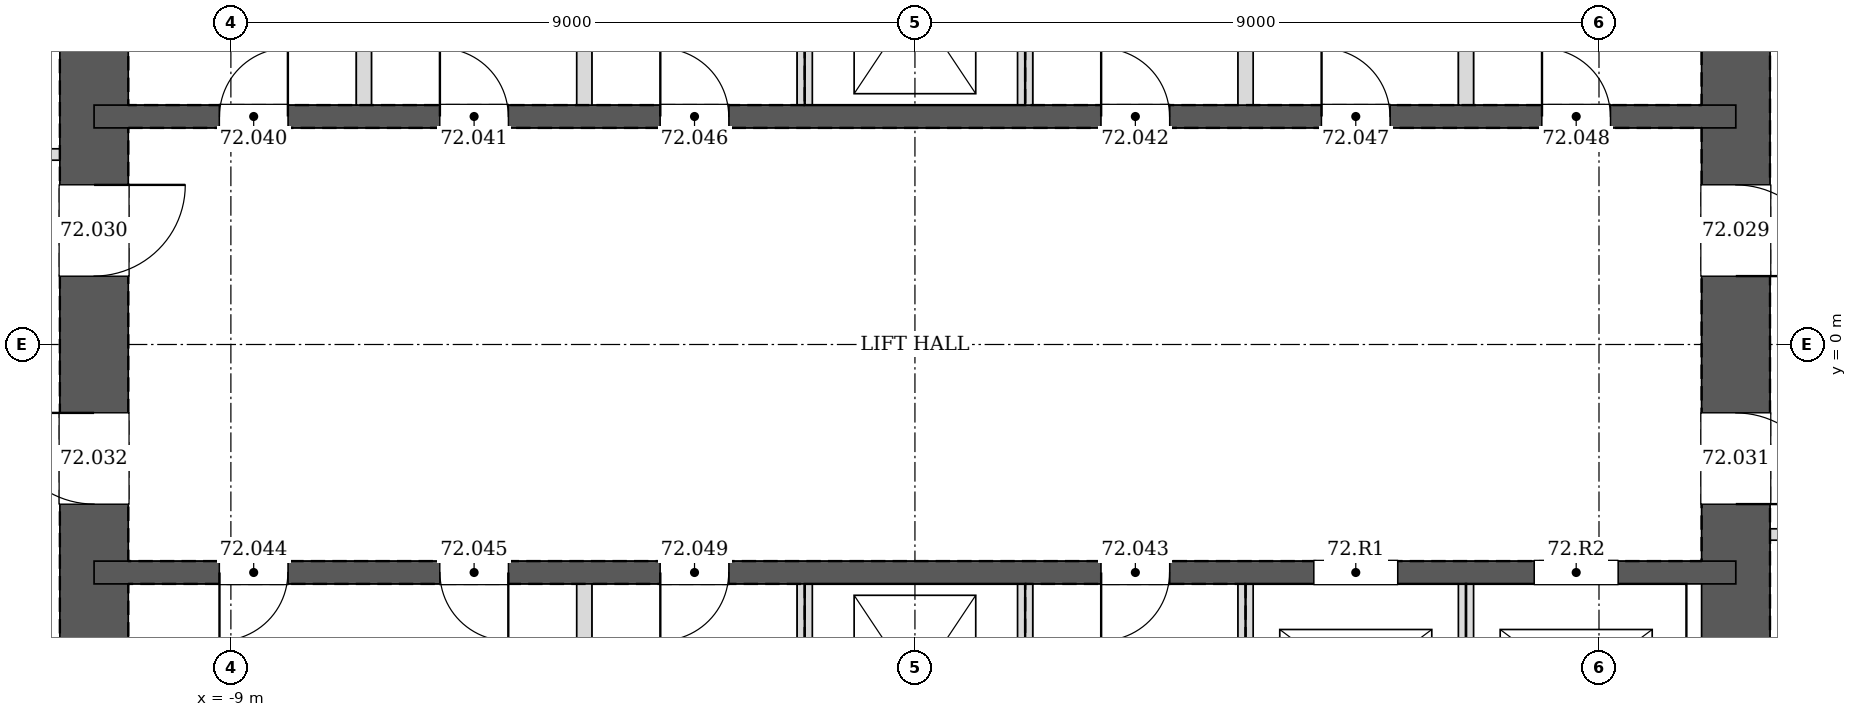
"""IFC4 building model, lengths in metres.
Left out: names, types, materials, properties, quantities, classifications, styles, units other than length and angle.
Written with IfcOpenShell. Run it as: python <this file> out.ifc"""

import sys

from ifc_helpers import new_model, si_unit, direction, frame, frame_2d, origin, place, context, subcontext, project, spatial, rectangle, extrude, element, fill, save


model = new_model("IFC4")
c1 = context("Model", 3, precision=1e-05, world=origin(), true_north=direction((0.0, 1.0)))
c2 = subcontext(c1, "Body", "Model", "MODEL_VIEW")
j1 = project(units=[si_unit("LENGTHUNIT", "METRE"), si_unit("PLANEANGLEUNIT", "RADIAN")], contexts=[c1])
p1 = place(None, origin())
s1 = spatial("IfcSite", under=j1, at=p1, CompositionType="ELEMENT")
p2 = place(p1, origin())
s2 = spatial("IfcBuilding", under=s1, at=p2, CompositionType="ELEMENT")
p3 = place(p2, frame((0.0, 0.0, 294.6)))
s3 = spatial("IfcBuildingStorey", under=s2, at=p3, CompositionType="ELEMENT", Elevation=294.6)
p4 = place(p3, frame((10.8, -10.8, 0.0), z_axis=(0.0, 0.0, 1.0), x_axis=(0.0, 1.0, 0.0)))
e1 = element("IfcWall", 1, at=p4, inside=s3, PredefinedType="SOLIDWALL", context=c2, shape_type="SweptSolid", body=[
    extrude(rectangle(XDim=21.6, YDim=0.9, at=frame_2d((10.8, 0.0))), origin(), (0.0, 0.0, 1.0), 3.4),
])
p5 = place(p4, frame((11.7, 0.0, 0.0)))
e2 = element("IfcOpeningElement", 2, at=p5, cuts=e1, PredefinedType="OPENING", context=c2, shape_type="SweptSolid", body=[
    extrude(rectangle(XDim=1.2, YDim=2.1, at=frame_2d((0.6, 1.05))), frame((0.0, 0.46, 0.0), z_axis=(0.0, -1.0, 0.0), x_axis=(1.0, 0.0, 0.0)), (0.0, 0.0, 1.0), 0.92),
])
p6 = place(p4, frame((8.7, 0.0, 0.0)))
e3 = element("IfcOpeningElement", 3, at=p6, cuts=e1, PredefinedType="OPENING", context=c2, shape_type="SweptSolid", body=[
    extrude(rectangle(XDim=1.2, YDim=2.1, at=frame_2d((0.6, 1.05))), frame((0.0, 0.46, 0.0), z_axis=(0.0, -1.0, 0.0), x_axis=(1.0, 0.0, 0.0)), (0.0, 0.0, 1.0), 0.92),
])
p7 = place(p3, frame((-10.8, 10.8, 0.0), z_axis=(0.0, 0.0, 1.0), x_axis=(0.0, -1.0, 0.0)))
e4 = element("IfcWall", 4, at=p7, inside=s3, PredefinedType="SOLIDWALL", context=c2, shape_type="SweptSolid", body=[
    extrude(rectangle(XDim=21.6, YDim=0.9, at=frame_2d((10.8, 0.0))), origin(), (0.0, 0.0, 1.0), 3.4),
])
p8 = place(p7, frame((8.7, 0.0, 0.0)))
e5 = element("IfcOpeningElement", 5, at=p8, cuts=e4, PredefinedType="OPENING", context=c2, shape_type="SweptSolid", body=[
    extrude(rectangle(XDim=1.2, YDim=2.1, at=frame_2d((0.6, 1.05))), frame((0.0, 0.46, 0.0), z_axis=(0.0, -1.0, 0.0), x_axis=(1.0, 0.0, 0.0)), (0.0, 0.0, 1.0), 0.92),
])
p9 = place(p7, frame((11.7, 0.0, 0.0)))
e6 = element("IfcOpeningElement", 6, at=p9, cuts=e4, PredefinedType="OPENING", context=c2, shape_type="SweptSolid", body=[
    extrude(rectangle(XDim=1.2, YDim=2.1, at=frame_2d((0.6, 1.05))), frame((0.0, 0.46, 0.0), z_axis=(0.0, -1.0, 0.0), x_axis=(1.0, 0.0, 0.0)), (0.0, 0.0, 1.0), 0.92),
])
p10 = place(p3, frame((-10.8, 3.0, 0.0), z_axis=(0.0, 0.0, 1.0), x_axis=(1.0, 0.0, 0.0)))
e7 = element("IfcWall", 7, at=p10, inside=s3, PredefinedType="SOLIDWALL", context=c2, shape_type="SweptSolid", body=[
    extrude(rectangle(XDim=21.6, YDim=0.3, at=frame_2d((10.8, 0.0))), origin(), (0.0, 0.0, 1.0), 3.4),
])
p11 = place(p10, frame((1.65, 0.0, 0.0)))
e8 = element("IfcOpeningElement", 8, at=p11, cuts=e7, PredefinedType="OPENING", context=c2, shape_type="SweptSolid", body=[
    extrude(rectangle(XDim=0.9, YDim=2.1, at=frame_2d((0.45, 1.05))), frame((0.0, 0.16, 0.0), z_axis=(0.0, -1.0, 0.0), x_axis=(1.0, 0.0, 0.0)), (0.0, 0.0, 1.0), 0.32),
])
p12 = place(p10, frame((4.55, 0.0, 0.0)))
e9 = element("IfcOpeningElement", 9, at=p12, cuts=e7, PredefinedType="OPENING", context=c2, shape_type="SweptSolid", body=[
    extrude(rectangle(XDim=0.9, YDim=2.1, at=frame_2d((0.45, 1.05))), frame((0.0, 0.16, 0.0), z_axis=(0.0, -1.0, 0.0), x_axis=(1.0, 0.0, 0.0)), (0.0, 0.0, 1.0), 0.32),
])
p13 = place(p10, frame((13.25, 0.0, 0.0)))
e10 = element("IfcOpeningElement", 10, at=p13, cuts=e7, PredefinedType="OPENING", context=c2, shape_type="SweptSolid", body=[
    extrude(rectangle(XDim=0.9, YDim=2.1, at=frame_2d((0.45, 1.05))), frame((0.0, 0.16, 0.0), z_axis=(0.0, -1.0, 0.0), x_axis=(1.0, 0.0, 0.0)), (0.0, 0.0, 1.0), 0.32),
])
p14 = place(p10, frame((7.45, 0.0, 0.0)))
e11 = element("IfcOpeningElement", 11, at=p14, cuts=e7, PredefinedType="OPENING", context=c2, shape_type="SweptSolid", body=[
    extrude(rectangle(XDim=0.9, YDim=2.1, at=frame_2d((0.45, 1.05))), frame((0.0, 0.16, 0.0), z_axis=(0.0, -1.0, 0.0), x_axis=(1.0, 0.0, 0.0)), (0.0, 0.0, 1.0), 0.32),
])
p15 = place(p10, frame((16.15, 0.0, 0.0)))
e12 = element("IfcOpeningElement", 12, at=p15, cuts=e7, PredefinedType="OPENING", context=c2, shape_type="SweptSolid", body=[
    extrude(rectangle(XDim=0.9, YDim=2.1, at=frame_2d((0.45, 1.05))), frame((0.0, 0.16, 0.0), z_axis=(0.0, -1.0, 0.0), x_axis=(1.0, 0.0, 0.0)), (0.0, 0.0, 1.0), 0.32),
])
p16 = place(p10, frame((19.05, 0.0, 0.0)))
e13 = element("IfcOpeningElement", 13, at=p16, cuts=e7, PredefinedType="OPENING", context=c2, shape_type="SweptSolid", body=[
    extrude(rectangle(XDim=0.9, YDim=2.1, at=frame_2d((0.45, 1.05))), frame((0.0, 0.16, 0.0), z_axis=(0.0, -1.0, 0.0), x_axis=(1.0, 0.0, 0.0)), (0.0, 0.0, 1.0), 0.32),
])
p17 = place(p3, frame((-10.8, -3.0, 0.0), z_axis=(0.0, 0.0, 1.0), x_axis=(1.0, 0.0, 0.0)))
e14 = element("IfcWall", 14, at=p17, inside=s3, PredefinedType="SOLIDWALL", context=c2, shape_type="SweptSolid", body=[
    extrude(rectangle(XDim=21.6, YDim=0.3, at=frame_2d((10.8, 0.0))), origin(), (0.0, 0.0, 1.0), 3.4),
])
p18 = place(p17, frame((13.25, 0.0, 0.0)))
e15 = element("IfcOpeningElement", 15, at=p18, cuts=e14, PredefinedType="OPENING", context=c2, shape_type="SweptSolid", body=[
    extrude(rectangle(XDim=0.9, YDim=2.1, at=frame_2d((0.45, 1.05))), frame((0.0, 0.16, 0.0), z_axis=(0.0, -1.0, 0.0), x_axis=(1.0, 0.0, 0.0)), (0.0, 0.0, 1.0), 0.32),
])
p19 = place(p17, frame((1.65, 0.0, 0.0)))
e16 = element("IfcOpeningElement", 16, at=p19, cuts=e14, PredefinedType="OPENING", context=c2, shape_type="SweptSolid", body=[
    extrude(rectangle(XDim=0.9, YDim=2.1, at=frame_2d((0.45, 1.05))), frame((0.0, 0.16, 0.0), z_axis=(0.0, -1.0, 0.0), x_axis=(1.0, 0.0, 0.0)), (0.0, 0.0, 1.0), 0.32),
])
p20 = place(p17, frame((4.55, 0.0, 0.0)))
e17 = element("IfcOpeningElement", 17, at=p20, cuts=e14, PredefinedType="OPENING", context=c2, shape_type="SweptSolid", body=[
    extrude(rectangle(XDim=0.9, YDim=2.1, at=frame_2d((0.45, 1.05))), frame((0.0, 0.16, 0.0), z_axis=(0.0, -1.0, 0.0), x_axis=(1.0, 0.0, 0.0)), (0.0, 0.0, 1.0), 0.32),
])
p21 = place(p17, frame((7.45, 0.0, 0.0)))
e18 = element("IfcOpeningElement", 18, at=p21, cuts=e14, PredefinedType="OPENING", context=c2, shape_type="SweptSolid", body=[
    extrude(rectangle(XDim=0.9, YDim=2.1, at=frame_2d((0.45, 1.05))), frame((0.0, 0.16, 0.0), z_axis=(0.0, -1.0, 0.0), x_axis=(1.0, 0.0, 0.0)), (0.0, 0.0, 1.0), 0.32),
])
p22 = place(p17, frame((16.05, 0.0, 0.0)))
e19 = element("IfcOpeningElement", 19, at=p22, cuts=e14, PredefinedType="OPENING", context=c2, shape_type="SweptSolid", body=[
    extrude(rectangle(XDim=1.1, YDim=2.1, at=frame_2d((0.55, 1.05))), frame((0.0, 0.16, 0.0), z_axis=(0.0, -1.0, 0.0), x_axis=(1.0, 0.0, 0.0)), (0.0, 0.0, 1.0), 0.32),
])
p23 = place(p17, frame((18.95, 0.0, 0.0)))
e20 = element("IfcOpeningElement", 20, at=p23, cuts=e14, PredefinedType="OPENING", context=c2, shape_type="SweptSolid", body=[
    extrude(rectangle(XDim=1.1, YDim=2.1, at=frame_2d((0.55, 1.05))), frame((0.0, 0.16, 0.0), z_axis=(0.0, -1.0, 0.0), x_axis=(1.0, 0.0, 0.0)), (0.0, 0.0, 1.0), 0.32),
])
p24 = place(p3, frame((11.25, -2.5, 0.0), z_axis=(0.0, 0.0, 1.0), x_axis=(1.0, 0.0, 0.0)))
e21 = element("IfcWall", 21, at=p24, inside=s3, PredefinedType="PARTITIONING", context=c2, shape_type="SweptSolid", body=[
    extrude(rectangle(XDim=1.65, YDim=0.15, at=frame_2d((0.825, 0.0))), origin(), (0.0, 0.0, 1.0), 3.2),
])
p25 = place(p3, frame((-11.25, 2.5, 0.0), z_axis=(0.0, 0.0, 1.0), x_axis=(-1.0, 0.0, 0.0)))
e22 = element("IfcWall", 22, at=p25, inside=s3, PredefinedType="PARTITIONING", context=c2, shape_type="SweptSolid", body=[
    extrude(rectangle(XDim=1.65, YDim=0.15, at=frame_2d((0.825, 0.0))), origin(), (0.0, 0.0, 1.0), 3.2),
])
p26 = place(p25, frame((0.35, 0.0, 0.0)))
e23 = element("IfcOpeningElement", 23, at=p26, cuts=e22, PredefinedType="OPENING", context=c2, shape_type="SweptSolid", body=[
    extrude(rectangle(XDim=0.95, YDim=2.1, at=frame_2d((0.475, 1.05))), frame((0.0, 0.085, 0.0), z_axis=(0.0, -1.0, 0.0), x_axis=(1.0, 0.0, 0.0)), (0.0, 0.0, 1.0), 0.17),
])
for number, where, z_axis, x_axis in (
    (24, (-7.25, 3.15, 0.0), (0.0, 0.0, 1.0), (0.0, 1.0, 0.0)),
    (25, (-4.35, 3.15, 0.0), (0.0, 0.0, 1.0), (0.0, 1.0, 0.0)),
    (26, (-1.45, 3.15, 0.0), (0.0, 0.0, 1.0), (0.0, 1.0, 0.0)),
    (27, (1.45, 3.15, 0.0), (0.0, 0.0, 1.0), (0.0, 1.0, 0.0)),
    (28, (4.35, 3.15, 0.0), (0.0, 0.0, 1.0), (0.0, 1.0, 0.0)),
    (29, (7.25, 3.15, 0.0), (0.0, 0.0, 1.0), (0.0, 1.0, 0.0)),
    (30, (-4.35, -5.85, 0.0), (0.0, 0.0, 1.0), (0.0, 1.0, 0.0)),
    (31, (-1.45, -5.85, 0.0), (0.0, 0.0, 1.0), (0.0, 1.0, 0.0)),
    (32, (1.45, -5.85, 0.0), (0.0, 0.0, 1.0), (0.0, 1.0, 0.0)),
    (33, (4.35, -5.85, 0.0), (0.0, 0.0, 1.0), (0.0, 1.0, 0.0)),
):
    element("IfcWall", number, at=place(p3, frame(where, z_axis=z_axis, x_axis=x_axis)), inside=s3, PredefinedType="PARTITIONING", context=c2, shape_type="SweptSolid", body=[
        extrude(rectangle(XDim=2.7, YDim=0.2, at=frame_2d((1.35, 0.0))), origin(), (0.0, 0.0, 1.0), 3.2),
    ])
p27 = place(p3, frame((7.25, -5.85, 0.0), z_axis=(0.0, 0.0, 1.0), x_axis=(0.0, 1.0, 0.0)))
e34 = element("IfcWall", 34, at=p27, inside=s3, PredefinedType="PARTITIONING", context=c2, shape_type="SweptSolid", body=[
    extrude(rectangle(XDim=2.7, YDim=0.2, at=frame_2d((1.35, 0.0))), origin(), (0.0, 0.0, 1.0), 3.4),
])
p28 = place(p5, frame((1.2, 0.0, 0.0), z_axis=(0.0, 0.0, 1.0), x_axis=(-1.0, 0.0, 0.0)))
e35 = element("IfcDoor", 35, at=p28, inside=s3, OperationType="SINGLE_SWING_RIGHT", PredefinedType="DOOR", context=c2, shape_type="SweptSolid", body=[
    extrude(rectangle(XDim=1.2, YDim=2.1, at=frame_2d((0.6, 1.05))), frame((0.0, 0.025, 0.0), z_axis=(0.0, -1.0, 0.0), x_axis=(1.0, 0.0, 0.0)), (0.0, 0.0, 1.0), 0.05),
])
fill(e2, e35)
p29 = place(p8, origin())
e36 = element("IfcDoor", 36, at=p29, inside=s3, OperationType="SINGLE_SWING_LEFT", PredefinedType="DOOR", context=c2, shape_type="SweptSolid", body=[
    extrude(rectangle(XDim=1.2, YDim=2.1, at=frame_2d((0.6, 1.05))), frame((0.0, 0.025, 0.0), z_axis=(0.0, -1.0, 0.0), x_axis=(1.0, 0.0, 0.0)), (0.0, 0.0, 1.0), 0.05),
])
fill(e5, e36)
p30 = place(p6, frame((1.2, 0.0, 0.0), z_axis=(0.0, 0.0, 1.0), x_axis=(-1.0, 0.0, 0.0)))
e37 = element("IfcDoor", 37, at=p30, inside=s3, OperationType="SINGLE_SWING_RIGHT", PredefinedType="DOOR", context=c2, shape_type="SweptSolid", body=[
    extrude(rectangle(XDim=1.2, YDim=2.1, at=frame_2d((0.6, 1.05))), frame((0.0, 0.025, 0.0), z_axis=(0.0, -1.0, 0.0), x_axis=(1.0, 0.0, 0.0)), (0.0, 0.0, 1.0), 0.05),
])
fill(e3, e37)
p31 = place(p9, frame((1.2, 0.0, 0.0), z_axis=(0.0, 0.0, 1.0), x_axis=(-1.0, 0.0, 0.0)))
e38 = element("IfcDoor", 38, at=p31, inside=s3, OperationType="SINGLE_SWING_RIGHT", PredefinedType="DOOR", context=c2, shape_type="SweptSolid", body=[
    extrude(rectangle(XDim=1.2, YDim=2.1, at=frame_2d((0.6, 1.05))), frame((0.0, 0.025, 0.0), z_axis=(0.0, -1.0, 0.0), x_axis=(1.0, 0.0, 0.0)), (0.0, 0.0, 1.0), 0.05),
])
fill(e6, e38)
p32 = place(p11, origin())
e39 = element("IfcDoor", 39, at=p32, inside=s3, OperationType="SINGLE_SWING_RIGHT", PredefinedType="DOOR", context=c2, shape_type="SweptSolid", body=[
    extrude(rectangle(XDim=0.9, YDim=2.1, at=frame_2d((0.45, 1.05))), frame((0.0, 0.025, 0.0), z_axis=(0.0, -1.0, 0.0), x_axis=(1.0, 0.0, 0.0)), (0.0, 0.0, 1.0), 0.05),
])
fill(e8, e39)
p33 = place(p12, origin())
e40 = element("IfcDoor", 40, at=p33, inside=s3, OperationType="SINGLE_SWING_LEFT", PredefinedType="DOOR", context=c2, shape_type="SweptSolid", body=[
    extrude(rectangle(XDim=0.9, YDim=2.1, at=frame_2d((0.45, 1.05))), frame((0.0, 0.025, 0.0), z_axis=(0.0, -1.0, 0.0), x_axis=(1.0, 0.0, 0.0)), (0.0, 0.0, 1.0), 0.05),
])
fill(e9, e40)
p34 = place(p13, origin())
e41 = element("IfcDoor", 41, at=p34, inside=s3, OperationType="SINGLE_SWING_LEFT", PredefinedType="DOOR", context=c2, shape_type="SweptSolid", body=[
    extrude(rectangle(XDim=0.9, YDim=2.1, at=frame_2d((0.45, 1.05))), frame((0.0, 0.025, 0.0), z_axis=(0.0, -1.0, 0.0), x_axis=(1.0, 0.0, 0.0)), (0.0, 0.0, 1.0), 0.05),
])
fill(e10, e41)
p35 = place(p18, frame((0.9, 0.0, 0.0), z_axis=(0.0, 0.0, 1.0), x_axis=(-1.0, 0.0, 0.0)))
e42 = element("IfcDoor", 42, at=p35, inside=s3, OperationType="SINGLE_SWING_RIGHT", PredefinedType="DOOR", context=c2, shape_type="SweptSolid", body=[
    extrude(rectangle(XDim=0.9, YDim=2.1, at=frame_2d((0.45, 1.05))), frame((0.0, 0.025, 0.0), z_axis=(0.0, -1.0, 0.0), x_axis=(1.0, 0.0, 0.0)), (0.0, 0.0, 1.0), 0.05),
])
fill(e15, e42)
p36 = place(p19, frame((0.9, 0.0, 0.0), z_axis=(0.0, 0.0, 1.0), x_axis=(-1.0, 0.0, 0.0)))
e43 = element("IfcDoor", 43, at=p36, inside=s3, OperationType="SINGLE_SWING_RIGHT", PredefinedType="DOOR", context=c2, shape_type="SweptSolid", body=[
    extrude(rectangle(XDim=0.9, YDim=2.1, at=frame_2d((0.45, 1.05))), frame((0.0, 0.025, 0.0), z_axis=(0.0, -1.0, 0.0), x_axis=(1.0, 0.0, 0.0)), (0.0, 0.0, 1.0), 0.05),
])
fill(e16, e43)
p37 = place(p20, frame((0.9, 0.0, 0.0), z_axis=(0.0, 0.0, 1.0), x_axis=(-1.0, 0.0, 0.0)))
e44 = element("IfcDoor", 44, at=p37, inside=s3, OperationType="SINGLE_SWING_LEFT", PredefinedType="DOOR", context=c2, shape_type="SweptSolid", body=[
    extrude(rectangle(XDim=0.9, YDim=2.1, at=frame_2d((0.45, 1.05))), frame((0.0, 0.025, 0.0), z_axis=(0.0, -1.0, 0.0), x_axis=(1.0, 0.0, 0.0)), (0.0, 0.0, 1.0), 0.05),
])
fill(e17, e44)
p38 = place(p14, origin())
e45 = element("IfcDoor", 45, at=p38, inside=s3, OperationType="SINGLE_SWING_LEFT", PredefinedType="DOOR", context=c2, shape_type="SweptSolid", body=[
    extrude(rectangle(XDim=0.9, YDim=2.1, at=frame_2d((0.45, 1.05))), frame((0.0, 0.025, 0.0), z_axis=(0.0, -1.0, 0.0), x_axis=(1.0, 0.0, 0.0)), (0.0, 0.0, 1.0), 0.05),
])
fill(e11, e45)
p39 = place(p15, origin())
e46 = element("IfcDoor", 46, at=p39, inside=s3, OperationType="SINGLE_SWING_LEFT", PredefinedType="DOOR", context=c2, shape_type="SweptSolid", body=[
    extrude(rectangle(XDim=0.9, YDim=2.1, at=frame_2d((0.45, 1.05))), frame((0.0, 0.025, 0.0), z_axis=(0.0, -1.0, 0.0), x_axis=(1.0, 0.0, 0.0)), (0.0, 0.0, 1.0), 0.05),
])
fill(e12, e46)
p40 = place(p16, origin())
e47 = element("IfcDoor", 47, at=p40, inside=s3, OperationType="SINGLE_SWING_LEFT", PredefinedType="DOOR", context=c2, shape_type="SweptSolid", body=[
    extrude(rectangle(XDim=0.9, YDim=2.1, at=frame_2d((0.45, 1.05))), frame((0.0, 0.025, 0.0), z_axis=(0.0, -1.0, 0.0), x_axis=(1.0, 0.0, 0.0)), (0.0, 0.0, 1.0), 0.05),
])
fill(e13, e47)
p41 = place(p21, frame((0.9, 0.0, 0.0), z_axis=(0.0, 0.0, 1.0), x_axis=(-1.0, 0.0, 0.0)))
e48 = element("IfcDoor", 48, at=p41, inside=s3, OperationType="SINGLE_SWING_RIGHT", PredefinedType="DOOR", context=c2, shape_type="SweptSolid", body=[
    extrude(rectangle(XDim=0.9, YDim=2.1, at=frame_2d((0.45, 1.05))), frame((0.0, 0.025, 0.0), z_axis=(0.0, -1.0, 0.0), x_axis=(1.0, 0.0, 0.0)), (0.0, 0.0, 1.0), 0.05),
])
fill(e18, e48)
p42 = place(p22, origin())
e49 = element("IfcDoor", 49, at=p42, inside=s3, OperationType="DOUBLE_DOOR_SLIDING", PredefinedType="DOOR", context=c2, shape_type="SweptSolid", body=[
    extrude(rectangle(XDim=1.1, YDim=2.1, at=frame_2d((0.55, 1.05))), frame((0.0, 0.025, 0.0), z_axis=(0.0, -1.0, 0.0), x_axis=(1.0, 0.0, 0.0)), (0.0, 0.0, 1.0), 0.05),
])
fill(e19, e49)
p43 = place(p23, origin())
e50 = element("IfcDoor", 50, at=p43, inside=s3, OperationType="DOUBLE_DOOR_SLIDING", PredefinedType="DOOR", context=c2, shape_type="SweptSolid", body=[
    extrude(rectangle(XDim=1.1, YDim=2.1, at=frame_2d((0.55, 1.05))), frame((0.0, 0.025, 0.0), z_axis=(0.0, -1.0, 0.0), x_axis=(1.0, 0.0, 0.0)), (0.0, 0.0, 1.0), 0.05),
])
fill(e20, e50)
save(model, sys.argv[1])
